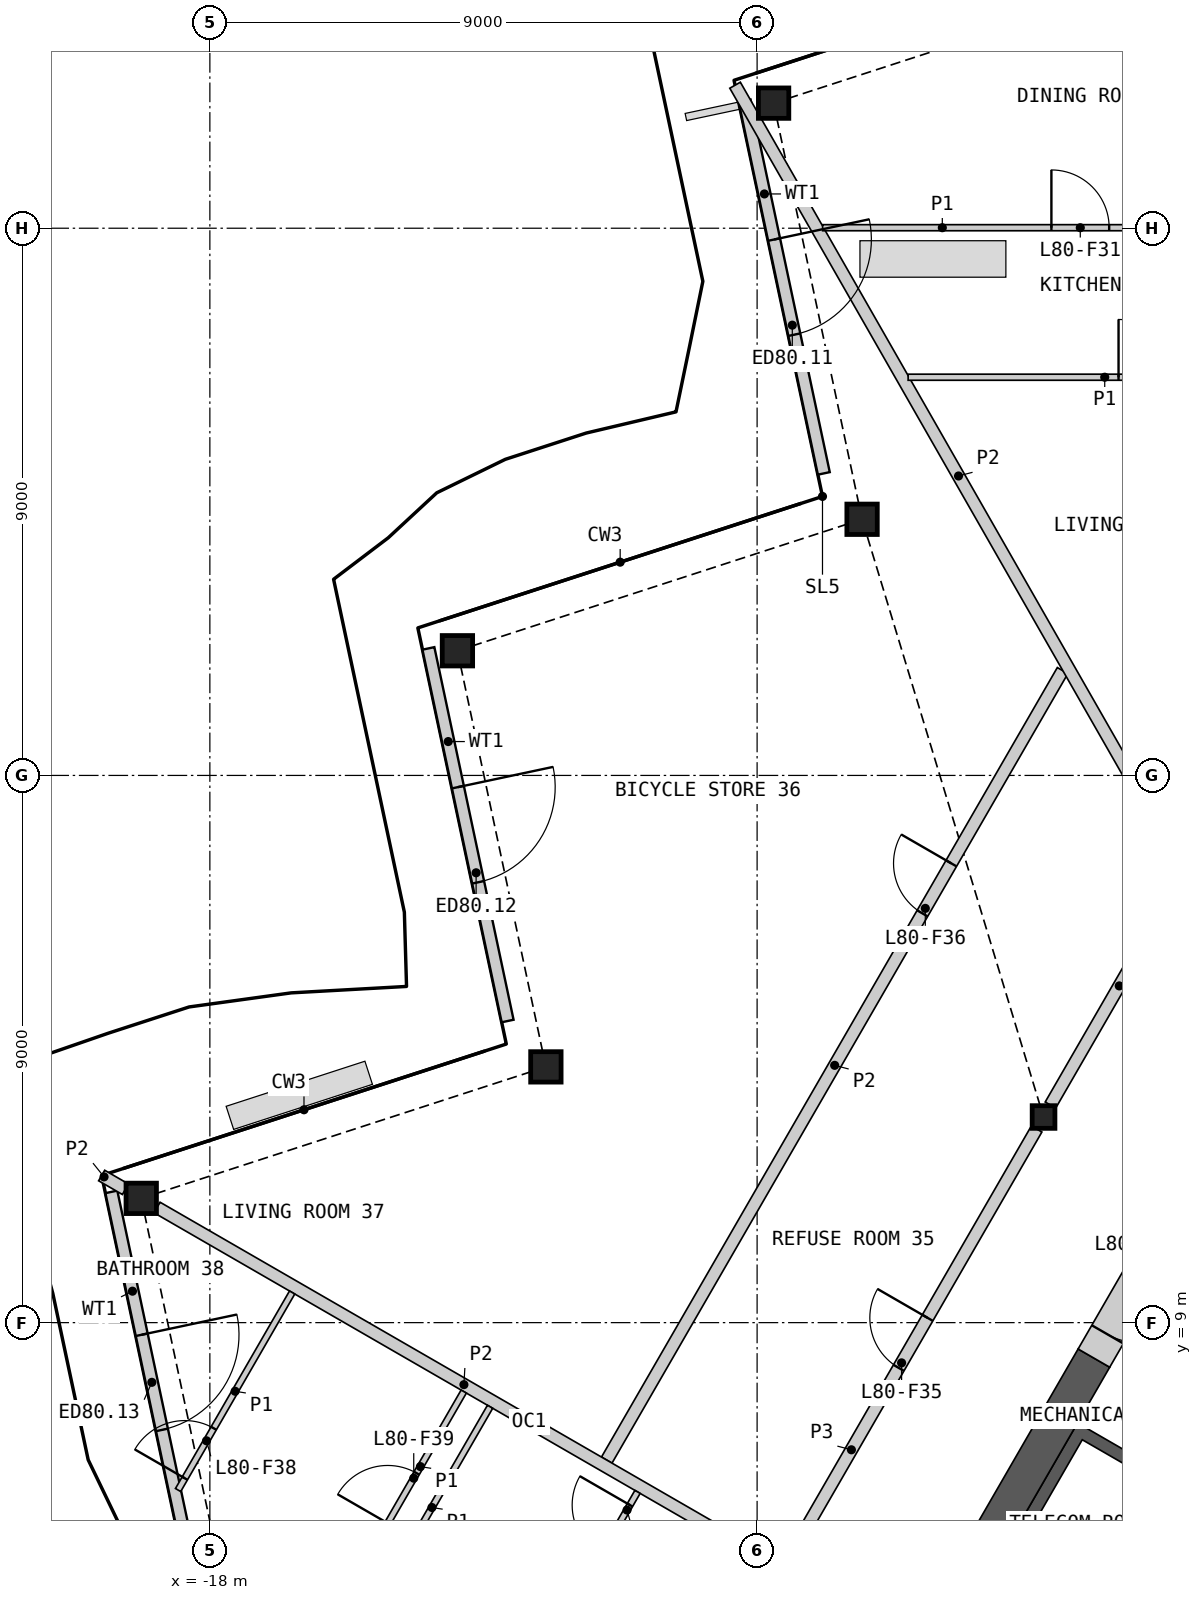
"""IFC4 building model, lengths in metres.
Left out: names, types, materials, properties, quantities, classifications, styles, units other than length and angle.
Written with IfcOpenShell. Run it as: python <this file> out.ifc"""

import sys

from ifc_helpers import new_model, si_unit, direction, frame, frame_2d, origin, origin_2d, place, context, subcontext, project, spatial, polyline, rectangle, hollow_rectangle, i_section, outline, extrude, element, fill, save


model = new_model("IFC4")
c1 = context("Model", 3, precision=1e-05, world=origin(), true_north=direction((0.0, 1.0)))
c2 = subcontext(c1, "Body", "Model", "MODEL_VIEW")
j1 = project(units=[si_unit("LENGTHUNIT", "METRE"), si_unit("PLANEANGLEUNIT", "RADIAN")], contexts=[c1])
p1 = place(None, origin())
s1 = spatial("IfcSite", under=j1, at=p1, CompositionType="ELEMENT")
p2 = place(p1, origin())
s2 = spatial("IfcBuilding", under=s1, at=p2, CompositionType="ELEMENT")
p3 = place(p2, frame((0.0, 0.0, 361.0)))
s3 = spatial("IfcBuildingStorey", under=s2, at=p3, CompositionType="ELEMENT", Elevation=361.0)
for number, where, z_axis, x_axis in (
    (1, (-8.729, 29.057, 0.0), (0.0, 0.0, 1.0), (1.0, 0.0, 0.0)),
    (2, (-7.274, 22.213, 0.0), (0.0, 0.0, 1.0), (1.0, 0.0, 0.0)),
    (3, (-13.929, 20.051, 0.0), (0.0, 0.0, 1.0), (1.0, 0.0, 0.0)),
    (4, (-12.474, 13.206, 0.0), (0.0, 0.0, 1.0), (1.0, 0.0, 0.0)),
    (5, (-19.129, 11.044, 0.0), (0.0, 0.0, 1.0), (1.0, 0.0, 0.0)),
):
    element("IfcColumn", number, at=place(p3, frame(where, z_axis=z_axis, x_axis=x_axis)), inside=s3, PredefinedType="COLUMN", context=c2, shape_type="SweptSolid", body=[
        extrude(hollow_rectangle(XDim=0.5, YDim=0.5, WallThickness=0.03, at=origin_2d()), origin(), (0.0, 0.0, 1.0), 3.4),
    ])
p4 = place(p3, frame((-4.289, 12.382, 0.0), z_axis=(0.0, 0.0, 1.0), x_axis=(1.0, 0.0, 0.0)))
e6 = element("IfcColumn", 6, at=p4, inside=s3, PredefinedType="COLUMN", context=c2, shape_type="SweptSolid", body=[
    extrude(i_section(OverallWidth=0.374, OverallDepth=0.372, WebThickness=0.016, FlangeThickness=0.026, at=origin_2d()), origin(), (0.0, 0.0, 1.0), 3.4),
])
p5 = place(p3, frame((-9.206, 29.096, 0.0), z_axis=(0.0, 0.0, 1.0), x_axis=(0.207889514624, -0.978152314167, 0.0)))
e7 = element("IfcWall", 7, at=p5, inside=s3, PredefinedType="SOLIDWALL", context=c2, shape_type="SweptSolid", body=[
    extrude(rectangle(XDim=6.265, YDim=0.2, at=frame_2d((3.133, 0.0))), origin(), (0.0, 0.0, 1.0), 2.634),
])
p6 = place(p5, frame((2.333, 0.0, 0.0)))
e8 = element("IfcOpeningElement", 8, at=p6, cuts=e7, PredefinedType="OPENING", context=c2, shape_type="SweptSolid", body=[
    extrude(rectangle(XDim=1.6, YDim=2.25, at=frame_2d((0.8, 1.125))), frame((0.0, 0.11, 0.0), z_axis=(0.0, -1.0, 0.0), x_axis=(1.0, 0.0, 0.0)), (0.0, 0.0, 1.0), 0.22),
])
p7 = place(p3, frame((-14.406, 20.089, 0.0), z_axis=(0.0, 0.0, 1.0), x_axis=(0.207889514624, -0.978152314167, 0.0)))
e9 = element("IfcWall", 9, at=p7, inside=s3, PredefinedType="SOLIDWALL", context=c2, shape_type="SweptSolid", body=[
    extrude(rectangle(XDim=6.265, YDim=0.2, at=frame_2d((3.133, 0.0))), origin(), (0.0, 0.0, 1.0), 2.634),
])
p8 = place(p7, frame((2.333, 0.0, 0.0)))
e10 = element("IfcOpeningElement", 10, at=p8, cuts=e9, PredefinedType="OPENING", context=c2, shape_type="SweptSolid", body=[
    extrude(rectangle(XDim=1.6, YDim=2.25, at=frame_2d((0.8, 1.125))), frame((0.0, 0.11, 0.0), z_axis=(0.0, -1.0, 0.0), x_axis=(1.0, 0.0, 0.0)), (0.0, 0.0, 1.0), 0.22),
])
p9 = place(p3, frame((-19.62, 11.15, 0.0), z_axis=(0.0, 0.0, 1.0), x_axis=(0.207933518746, -0.97814296081, 0.0)))
e11 = element("IfcWall", 11, at=p9, inside=s3, PredefinedType="SOLIDWALL", context=c2, shape_type="SweptSolid", body=[
    extrude(rectangle(XDim=6.678, YDim=0.2, at=frame_2d((3.339, 0.0))), origin(), (0.0, 0.0, 1.0), 2.634),
])
p10 = place(p9, frame((2.402, 0.0, 0.0)))
e12 = element("IfcOpeningElement", 12, at=p10, cuts=e11, PredefinedType="OPENING", context=c2, shape_type="SweptSolid", body=[
    extrude(rectangle(XDim=1.6, YDim=2.25, at=frame_2d((0.8, 1.125))), frame((0.0, 0.11, 0.0), z_axis=(0.0, -1.0, 0.0), x_axis=(1.0, 0.0, 0.0)), (0.0, 0.0, 1.0), 0.22),
])
p11 = place(p3, origin())
e13 = element("IfcWall", 13, at=p11, inside=s3, PredefinedType="SHEAR", context=c2, shape_type="SweptSolid", body=[
    extrude(outline(polyline([(-4.96, 0.208), (-7.131, 1.461), (-3.731, 7.35), (-1.561, 6.097), (-1.66, 5.924), (-3.652, 7.074), (-5.752, 3.437), (-3.76, 2.287), (-3.861, 2.113), (-5.852, 3.263), (-6.852, 1.531), (-4.861, 0.381), (-4.96, 0.208)])), origin(), (0.0, 0.0, 1.0), 3.1),
])
p12 = place(p3, frame((-1.631, 5.776, 0.0), z_axis=(0.0, 0.0, 1.0), x_axis=(-0.499992876559, -0.866029516466, 0.0)))
e14 = element("IfcWall", 14, at=p12, inside=s3, PredefinedType="SOLIDWALL", context=c2, shape_type="SweptSolid", body=[
    extrude(rectangle(XDim=6.486, YDim=0.2, at=frame_2d((3.243, 0.0))), origin(), (0.0, 0.0, 1.0), 3.1),
])
p13 = place(p12, frame((1.537, 0.0, 0.0)))
e15 = element("IfcOpeningElement", 15, at=p13, cuts=e14, PredefinedType="OPENING", context=c2, shape_type="SweptSolid", body=[
    extrude(rectangle(XDim=0.9, YDim=2.1, at=frame_2d((0.45, 1.05))), frame((0.0, 0.11, 0.0), z_axis=(0.0, -1.0, 0.0), x_axis=(1.0, 0.0, 0.0)), (0.0, 0.0, 1.0), 0.22),
])
p14 = place(p12, frame((4.837, 0.0, 0.0)))
e16 = element("IfcOpeningElement", 16, at=p14, cuts=e14, PredefinedType="OPENING", context=c2, shape_type="SweptSolid", body=[
    extrude(rectangle(XDim=0.9, YDim=2.1, at=frame_2d((0.45, 1.05))), frame((0.0, 0.11, 0.0), z_axis=(0.0, -1.0, 0.0), x_axis=(1.0, 0.0, 0.0)), (0.0, 0.0, 1.0), 0.22),
])
p15 = place(p3, frame((-3.461, 8.417, 0.0), z_axis=(0.0, 0.0, 1.0), x_axis=(-0.50000391502, -0.866023143435, 0.0)))
e17 = element("IfcWall", 17, at=p15, inside=s3, PredefinedType="SHEAR", context=c2, shape_type="SweptSolid", body=[
    extrude(rectangle(XDim=7.759, YDim=0.6, at=frame_2d((3.879, 0.0))), origin(), (0.0, 0.0, 1.0), 3.1),
])
p16 = place(p3, frame((-2.361, 10.322, 0.0), z_axis=(0.0, 0.0, 1.0), x_axis=(-0.499946605688, -0.86605622881, 0.0)))
e18 = element("IfcWall", 18, at=p16, inside=s3, PredefinedType="SHEAR", context=c2, shape_type="SweptSolid", body=[
    extrude(rectangle(XDim=2.2, YDim=0.6, at=frame_2d((1.1, 0.0))), origin(), (0.0, 0.0, 1.0), 3.1),
])
p17 = place(p16, frame((0.75, 0.0, 0.0)))
e19 = element("IfcOpeningElement", 19, at=p17, cuts=e18, PredefinedType="OPENING", context=c2, shape_type="SweptSolid", body=[
    extrude(rectangle(XDim=1.0, YDim=2.1, at=frame_2d((0.5, 1.05))), frame((0.0, 0.31, 0.0), z_axis=(0.0, -1.0, 0.0), x_axis=(1.0, 0.0, 0.0)), (0.0, 0.0, 1.0), 0.62),
])
p18 = place(p3, frame((-8.465, 5.15, 0.0), z_axis=(0.0, 0.0, 1.0), x_axis=(0.499992155518, 0.866029932751, 0.0)))
e20 = element("IfcWall", 20, at=p18, inside=s3, PredefinedType="PARTITIONING", context=c2, shape_type="SweptSolid", body=[
    extrude(rectangle(XDim=8.123, YDim=0.2, at=frame_2d((4.062, 0.0))), origin(), (0.0, 0.0, 1.0), 3.1),
])
p19 = place(p18, frame((3.587, 0.0, 0.0)))
e21 = element("IfcOpeningElement", 21, at=p19, cuts=e20, PredefinedType="OPENING", context=c2, shape_type="SweptSolid", body=[
    extrude(rectangle(XDim=0.95, YDim=2.1, at=frame_2d((0.475, 1.05))), frame((0.0, 0.11, 0.0), z_axis=(0.0, -1.0, 0.0), x_axis=(1.0, 0.0, 0.0)), (0.0, 0.0, 1.0), 0.22),
])
p20 = place(p3, frame((-4.176, 12.579, 0.0), z_axis=(0.0, 0.0, 1.0), x_axis=(0.499974648164, 0.866040040179, 0.0)))
e22 = element("IfcWall", 22, at=p20, inside=s3, PredefinedType="PARTITIONING", context=c2, shape_type="SweptSolid", body=[
    extrude(rectangle(XDim=4.525, YDim=0.2, at=frame_2d((2.263, 0.0))), origin(), (0.0, 0.0, 1.0), 3.1),
])
p21 = place(p3, frame((-11.473, 6.74, 0.0), z_axis=(0.0, 0.0, 1.0), x_axis=(0.499993542657, 0.866029131901, 0.0)))
e23 = element("IfcWall", 23, at=p21, inside=s3, PredefinedType="PARTITIONING", context=c2, shape_type="SweptSolid", body=[
    extrude(rectangle(XDim=14.994, YDim=0.2, at=frame_2d((7.497, 0.0))), origin(), (0.0, 0.0, 1.0), 2.33),
])
p22 = place(p21, frame((10.383, 0.0, 0.0)))
e24 = element("IfcOpeningElement", 24, at=p22, cuts=e23, PredefinedType="OPENING", context=c2, shape_type="SweptSolid", body=[
    extrude(rectangle(XDim=0.95, YDim=2.1, at=frame_2d((0.475, 1.05))), frame((0.0, 0.11, 0.0), z_axis=(0.0, -1.0, 0.0), x_axis=(1.0, 0.0, 0.0)), (0.0, 0.0, 1.0), 0.22),
])
p23 = place(p3, frame((-9.362, 29.352, 0.0), z_axis=(0.0, 0.0, 1.0), x_axis=(0.496351997927, -0.868121359116, 0.0)))
e25 = element("IfcWall", 25, at=p23, inside=s3, PredefinedType="PARTITIONING", context=c2, shape_type="SweptSolid", body=[
    extrude(rectangle(XDim=14.807, YDim=0.2, at=frame_2d((7.404, 0.0))), origin(), (0.0, 0.0, 1.0), 2.33),
])
p24 = place(p3, frame((-18.869, 10.894, 0.0), z_axis=(0.0, 0.0, 1.0), x_axis=(0.866023724155, -0.500002909193, 0.0)))
e26 = element("IfcWall", 26, at=p24, inside=s3, PredefinedType="PARTITIONING", context=c2, shape_type="SweptSolid", body=[
    extrude(rectangle(XDim=11.655, YDim=0.2, at=frame_2d((5.827, 0.0))), origin(), (0.0, 0.0, 1.0), 2.33),
])
p25 = place(p3, frame((-19.78, 11.42, 0.0), z_axis=(0.0, 0.0, 1.0), x_axis=(0.866104518135, -0.499862944882, 0.0)))
e27 = element("IfcWall", 27, at=p25, inside=s3, PredefinedType="PARTITIONING", context=c2, shape_type="SweptSolid", body=[
    extrude(rectangle(XDim=0.451, YDim=0.2, at=frame_2d((0.226, 0.0))), origin(), (0.0, 0.0, 1.0), 2.33),
])
p26 = place(p3, frame((-7.922, 27.009, 0.0), z_axis=(0.0, 0.0, 1.0), x_axis=(1.0, 0.0, 0.0)))
e28 = element("IfcWall", 28, at=p26, inside=s3, PredefinedType="PARTITIONING", context=c2, shape_type="SweptSolid", body=[
    extrude(rectangle(XDim=7.872, YDim=0.1, at=frame_2d((3.936, 0.0))), origin(), (0.0, 0.0, 1.0), 2.33),
])
p27 = place(p26, frame((3.762, 0.0, 0.0)))
e29 = element("IfcOpeningElement", 29, at=p27, cuts=e28, PredefinedType="OPENING", context=c2, shape_type="SweptSolid", body=[
    extrude(rectangle(XDim=0.95, YDim=2.1, at=frame_2d((0.475, 1.05))), frame((0.0, 0.06, 0.0), z_axis=(0.0, -1.0, 0.0), x_axis=(1.0, 0.0, 0.0)), (0.0, 0.0, 1.0), 0.12),
])
p28 = place(p3, frame((-6.516, 24.549, 0.0), z_axis=(0.0, 0.0, 1.0), x_axis=(1.0, 0.0, 0.0)))
e30 = element("IfcWall", 30, at=p28, inside=s3, PredefinedType="PARTITIONING", context=c2, shape_type="SweptSolid", body=[
    extrude(rectangle(XDim=6.466, YDim=0.1, at=frame_2d((3.233, 0.0))), origin(), (0.0, 0.0, 1.0), 2.33),
])
p29 = place(p28, frame((3.46, 0.0, 0.0)))
e31 = element("IfcOpeningElement", 31, at=p29, cuts=e30, PredefinedType="OPENING", context=c2, shape_type="SweptSolid", body=[
    extrude(rectangle(XDim=0.95, YDim=2.1, at=frame_2d((0.475, 1.05))), frame((0.0, 0.06, 0.0), z_axis=(0.0, -1.0, 0.0), x_axis=(1.0, 0.0, 0.0)), (0.0, 0.0, 1.0), 0.12),
])
p30 = place(p3, frame((-18.523, 6.247, 0.0), z_axis=(0.0, 0.0, 1.0), x_axis=(0.499981580887, 0.866036037803, 0.0)))
e32 = element("IfcWall", 32, at=p30, inside=s3, PredefinedType="PARTITIONING", context=c2, shape_type="SweptSolid", body=[
    extrude(rectangle(XDim=3.752, YDim=0.1, at=frame_2d((1.876, 0.0))), origin(), (0.0, 0.0, 1.0), 2.33),
])
p31 = place(p30, frame((0.222, 0.0, 0.0)))
e33 = element("IfcOpeningElement", 33, at=p31, cuts=e32, PredefinedType="OPENING", context=c2, shape_type="SweptSolid", body=[
    extrude(rectangle(XDim=0.95, YDim=2.1, at=frame_2d((0.475, 1.05))), frame((0.0, 0.06, 0.0), z_axis=(0.0, -1.0, 0.0), x_axis=(1.0, 0.0, 0.0)), (0.0, 0.0, 1.0), 0.12),
])
p32 = place(p3, frame((-15.25, 5.398, 0.0), z_axis=(0.0, 0.0, 1.0), x_axis=(0.499935029643, 0.866062911188, 0.0)))
e34 = element("IfcWall", 34, at=p32, inside=s3, PredefinedType="PARTITIONING", context=c2, shape_type="SweptSolid", body=[
    extrude(rectangle(XDim=2.85, YDim=0.1, at=frame_2d((1.425, 0.0))), origin(), (0.0, 0.0, 1.0), 2.33),
])
p33 = place(p32, frame((0.35, 0.0, 0.0)))
e35 = element("IfcOpeningElement", 35, at=p33, cuts=e34, PredefinedType="OPENING", context=c2, shape_type="SweptSolid", body=[
    extrude(rectangle(XDim=0.95, YDim=2.1, at=frame_2d((0.475, 1.05))), frame((0.0, 0.06, 0.0), z_axis=(0.0, -1.0, 0.0), x_axis=(1.0, 0.0, 0.0)), (0.0, 0.0, 1.0), 0.12),
])
p34 = place(p3, frame((-12.242, 4.008, 0.0), z_axis=(0.0, 0.0, 1.0), x_axis=(0.499948979701, 0.866054858364, 0.0)))
e36 = element("IfcWall", 36, at=p34, inside=s3, PredefinedType="PARTITIONING", context=c2, shape_type="SweptSolid", body=[
    extrude(rectangle(XDim=2.55, YDim=0.1, at=frame_2d((1.275, 0.0))), origin(), (0.0, 0.0, 1.0), 2.33),
])
p35 = place(p34, frame((1.35, 0.0, 0.0)))
e37 = element("IfcOpeningElement", 37, at=p35, cuts=e36, PredefinedType="OPENING", context=c2, shape_type="SweptSolid", body=[
    extrude(rectangle(XDim=0.95, YDim=2.1, at=frame_2d((0.475, 1.05))), frame((0.0, 0.06, 0.0), z_axis=(0.0, -1.0, 0.0), x_axis=(1.0, 0.0, 0.0)), (0.0, 0.0, 1.0), 0.12),
])
p36 = place(p3, frame((-14.667, 5.408, 0.0), z_axis=(0.0, 0.0, 1.0), x_axis=(0.499948979701, 0.866054858364, 0.0)))
e38 = element("IfcWall", 38, at=p36, inside=s3, PredefinedType="PARTITIONING", context=c2, shape_type="SweptSolid", body=[
    extrude(rectangle(XDim=2.55, YDim=0.1, at=frame_2d((1.275, 0.0))), origin(), (0.0, 0.0, 1.0), 2.33),
])
p37 = place(p6, origin())
e39 = element("IfcDoor", 39, at=p37, inside=s3, OperationType="DOUBLE_DOOR_SINGLE_SWING", PredefinedType="DOOR", context=c2, shape_type="SweptSolid", body=[
    extrude(rectangle(XDim=1.6, YDim=2.25, at=frame_2d((0.8, 1.125))), frame((0.0, 0.025, 0.0), z_axis=(0.0, -1.0, 0.0), x_axis=(1.0, 0.0, 0.0)), (0.0, 0.0, 1.0), 0.05),
])
fill(e8, e39)
p38 = place(p8, origin())
e40 = element("IfcDoor", 40, at=p38, inside=s3, OperationType="DOUBLE_DOOR_SINGLE_SWING", PredefinedType="DOOR", context=c2, shape_type="SweptSolid", body=[
    extrude(rectangle(XDim=1.6, YDim=2.25, at=frame_2d((0.8, 1.125))), frame((0.0, 0.025, 0.0), z_axis=(0.0, -1.0, 0.0), x_axis=(1.0, 0.0, 0.0)), (0.0, 0.0, 1.0), 0.05),
])
fill(e10, e40)
p39 = place(p10, origin())
e41 = element("IfcDoor", 41, at=p39, inside=s3, OperationType="DOUBLE_DOOR_SINGLE_SWING", PredefinedType="DOOR", context=c2, shape_type="SweptSolid", body=[
    extrude(rectangle(XDim=1.6, YDim=2.25, at=frame_2d((0.8, 1.125))), frame((0.0, 0.025, 0.0), z_axis=(0.0, -1.0, 0.0), x_axis=(1.0, 0.0, 0.0)), (0.0, 0.0, 1.0), 0.05),
])
fill(e12, e41)
p40 = place(p17, origin())
e42 = element("IfcDoor", 42, at=p40, inside=s3, OperationType="SINGLE_SWING_LEFT", PredefinedType="DOOR", context=c2, shape_type="SweptSolid", body=[
    extrude(rectangle(XDim=1.0, YDim=2.1, at=frame_2d((0.5, 1.05))), frame((0.0, 0.055, 0.0), z_axis=(0.0, -1.0, 0.0), x_axis=(1.0, 0.0, 0.0)), (0.0, 0.0, 1.0), 0.05),
])
fill(e19, e42)
p41 = place(p29, origin())
e43 = element("IfcDoor", 43, at=p41, inside=s3, OperationType="SINGLE_SWING_LEFT", PredefinedType="DOOR", context=c2, shape_type="SweptSolid", body=[
    extrude(rectangle(XDim=0.95, YDim=2.1, at=frame_2d((0.475, 1.05))), frame((0.0, 0.025, 0.0), z_axis=(0.0, -1.0, 0.0), x_axis=(1.0, 0.0, 0.0)), (0.0, 0.0, 1.0), 0.05),
])
fill(e31, e43)
p42 = place(p27, origin())
e44 = element("IfcDoor", 44, at=p42, inside=s3, OperationType="SINGLE_SWING_LEFT", PredefinedType="DOOR", context=c2, shape_type="SweptSolid", body=[
    extrude(rectangle(XDim=0.95, YDim=2.1, at=frame_2d((0.475, 1.05))), frame((0.0, 0.025, 0.0), z_axis=(0.0, -1.0, 0.0), x_axis=(1.0, 0.0, 0.0)), (0.0, 0.0, 1.0), 0.05),
])
fill(e29, e44)
p43 = place(p19, origin())
e45 = element("IfcDoor", 45, at=p43, inside=s3, OperationType="SINGLE_SWING_RIGHT", PredefinedType="DOOR", context=c2, shape_type="SweptSolid", body=[
    extrude(rectangle(XDim=0.95, YDim=2.1, at=frame_2d((0.475, 1.05))), frame((0.0, 0.025, 0.0), z_axis=(0.0, -1.0, 0.0), x_axis=(1.0, 0.0, 0.0)), (0.0, 0.0, 1.0), 0.05),
])
fill(e21, e45)
p44 = place(p22, origin())
e46 = element("IfcDoor", 46, at=p44, inside=s3, OperationType="SINGLE_SWING_RIGHT", PredefinedType="DOOR", context=c2, shape_type="SweptSolid", body=[
    extrude(rectangle(XDim=0.95, YDim=2.1, at=frame_2d((0.475, 1.05))), frame((0.0, 0.025, 0.0), z_axis=(0.0, -1.0, 0.0), x_axis=(1.0, 0.0, 0.0)), (0.0, 0.0, 1.0), 0.05),
])
fill(e24, e46)
p45 = place(p31, origin())
e47 = element("IfcDoor", 47, at=p45, inside=s3, OperationType="SINGLE_SWING_LEFT", PredefinedType="DOOR", context=c2, shape_type="SweptSolid", body=[
    extrude(rectangle(XDim=0.95, YDim=2.1, at=frame_2d((0.475, 1.05))), frame((0.0, 0.025, 0.0), z_axis=(0.0, -1.0, 0.0), x_axis=(1.0, 0.0, 0.0)), (0.0, 0.0, 1.0), 0.05),
])
fill(e33, e47)
p46 = place(p33, origin())
e48 = element("IfcDoor", 48, at=p46, inside=s3, OperationType="SINGLE_SWING_LEFT", PredefinedType="DOOR", context=c2, shape_type="SweptSolid", body=[
    extrude(rectangle(XDim=0.95, YDim=2.1, at=frame_2d((0.475, 1.05))), frame((0.0, 0.025, 0.0), z_axis=(0.0, -1.0, 0.0), x_axis=(1.0, 0.0, 0.0)), (0.0, 0.0, 1.0), 0.05),
])
fill(e35, e48)
p47 = place(p35, origin())
e49 = element("IfcDoor", 49, at=p47, inside=s3, OperationType="SINGLE_SWING_RIGHT", PredefinedType="DOOR", context=c2, shape_type="SweptSolid", body=[
    extrude(rectangle(XDim=0.95, YDim=2.1, at=frame_2d((0.475, 1.05))), frame((0.0, 0.025, 0.0), z_axis=(0.0, -1.0, 0.0), x_axis=(1.0, 0.0, 0.0)), (0.0, 0.0, 1.0), 0.05),
])
fill(e37, e49)
save(model, sys.argv[1])
